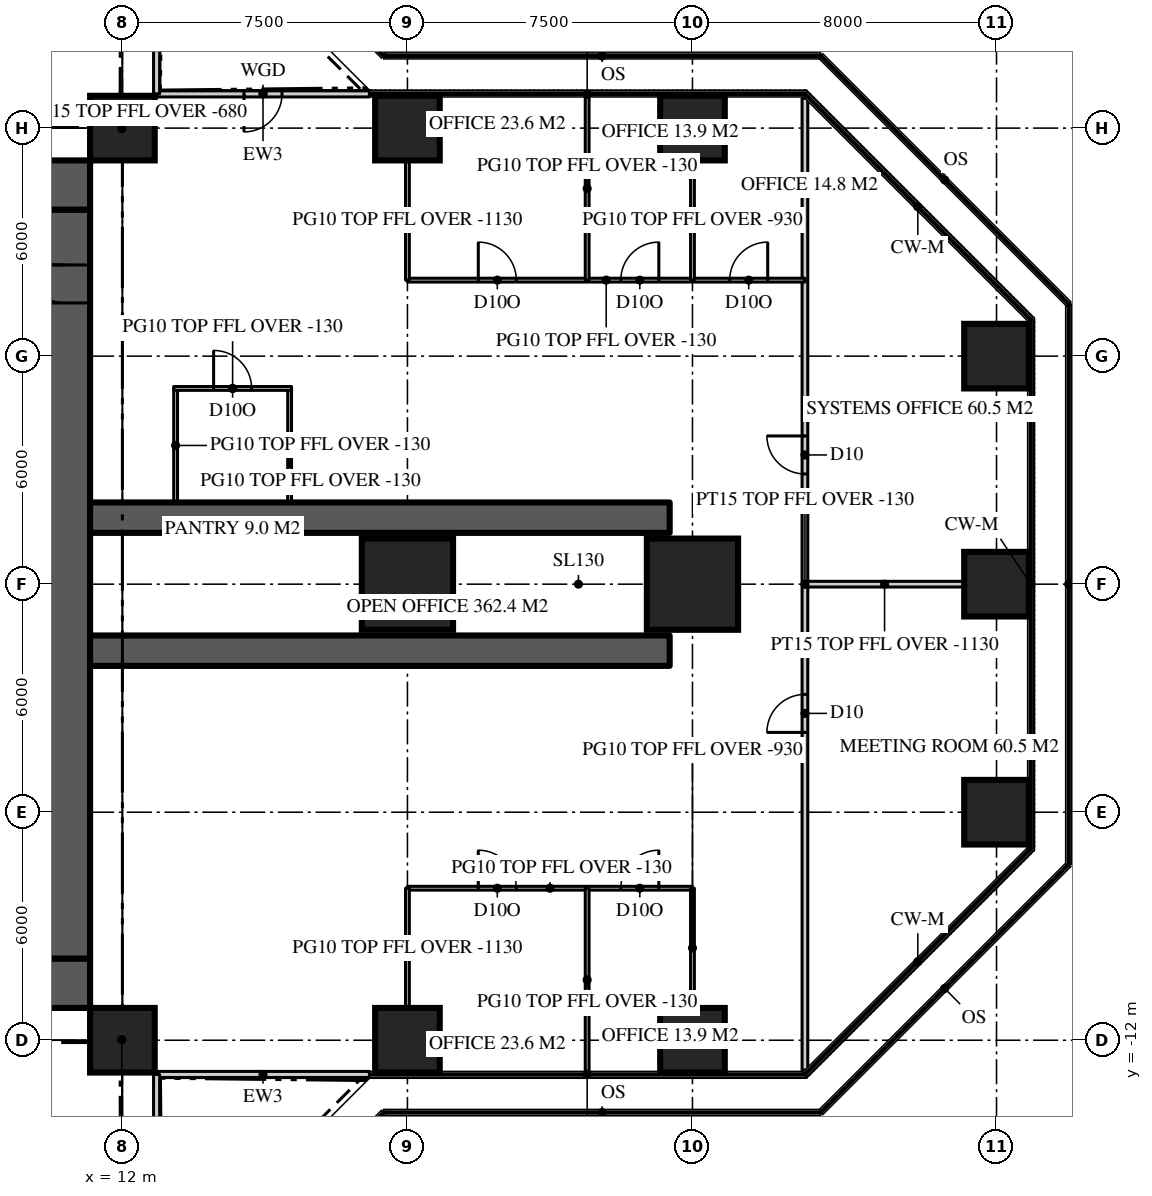
"""IFC4 building model, lengths in metres.
Left out: names, types, materials, properties, quantities, classifications, styles, units other than length and angle.
Written with IfcOpenShell. Run it as: python <this file> out.ifc"""

import sys

from ifc_helpers import new_model, si_unit, direction, frame, frame_2d, origin, origin_2d, place, context, subcontext, project, spatial, rectangle, extrude, element, fill, save


model = new_model("IFC4")
c1 = context("Model", 3, precision=1e-05, world=origin(), true_north=direction((0.0, 1.0)))
c2 = subcontext(c1, "Body", "Model", "MODEL_VIEW")
j1 = project(units=[si_unit("LENGTHUNIT", "METRE"), si_unit("PLANEANGLEUNIT", "RADIAN")], contexts=[c1])
p1 = place(None, origin())
s1 = spatial("IfcSite", under=j1, at=p1, CompositionType="ELEMENT")
p2 = place(p1, origin())
s2 = spatial("IfcBuilding", under=s1, at=p2, CompositionType="ELEMENT")
p3 = place(p2, frame((0.0, 0.0, 151.5)))
s3 = spatial("IfcBuildingStorey", under=s2, at=p3, CompositionType="ELEMENT", Elevation=151.5)
p4 = place(p3, frame((-11.15, 10.5, 0.0), z_axis=(0.0, 0.0, 1.0), x_axis=(1.0, 0.0, 0.0)))
e1 = element("IfcWall", 1, at=p4, inside=s3, PredefinedType="SHEAR", context=c2, shape_type="SweptSolid", body=[
    extrude(rectangle(XDim=22.3, YDim=1.3, at=frame_2d((11.15, 0.0))), origin(), (0.0, 0.0, 1.0), 3.9),
])
p5 = place(p4, frame((4.25, 0.0, 0.0)))
e2 = element("IfcOpeningElement", 2, at=p5, cuts=e1, PredefinedType="OPENING", context=c2, shape_type="SweptSolid", body=[
    extrude(rectangle(XDim=1.8, YDim=2.2, at=frame_2d((0.9, 1.1))), frame((0.0, 0.66, 0.0), z_axis=(0.0, -1.0, 0.0), x_axis=(1.0, 0.0, 0.0)), (0.0, 0.0, 1.0), 1.32),
])
p6 = place(p4, frame((16.25, 0.0, 0.0)))
e3 = element("IfcOpeningElement", 3, at=p6, cuts=e1, PredefinedType="OPENING", context=c2, shape_type="SweptSolid", body=[
    extrude(rectangle(XDim=1.8, YDim=2.2, at=frame_2d((0.9, 1.1))), frame((0.0, 0.66, 0.0), z_axis=(0.0, -1.0, 0.0), x_axis=(1.0, 0.0, 0.0)), (0.0, 0.0, 1.0), 1.32),
])
p7 = place(p3, frame((11.15, -10.5, 0.0), z_axis=(0.0, 0.0, 1.0), x_axis=(-1.0, 0.0, 0.0)))
e4 = element("IfcWall", 4, at=p7, inside=s3, PredefinedType="SHEAR", context=c2, shape_type="SweptSolid", body=[
    extrude(rectangle(XDim=22.3, YDim=1.3, at=frame_2d((11.15, 0.0))), origin(), (0.0, 0.0, 1.0), 3.9),
])
p8 = place(p7, frame((16.25, 0.0, 0.0)))
e5 = element("IfcOpeningElement", 5, at=p8, cuts=e4, PredefinedType="OPENING", context=c2, shape_type="SweptSolid", body=[
    extrude(rectangle(XDim=1.8, YDim=2.2, at=frame_2d((0.9, 1.1))), frame((0.0, 0.66, 0.0), z_axis=(0.0, -1.0, 0.0), x_axis=(1.0, 0.0, 0.0)), (0.0, 0.0, 1.0), 1.32),
])
p9 = place(p7, frame((4.25, 0.0, 0.0)))
e6 = element("IfcOpeningElement", 6, at=p9, cuts=e4, PredefinedType="OPENING", context=c2, shape_type="SweptSolid", body=[
    extrude(rectangle(XDim=1.8, YDim=2.2, at=frame_2d((0.9, 1.1))), frame((0.0, 0.66, 0.0), z_axis=(0.0, -1.0, 0.0), x_axis=(1.0, 0.0, 0.0)), (0.0, 0.0, 1.0), 1.32),
])
p10 = place(p3, frame((10.5, -9.85, 0.0), z_axis=(0.0, 0.0, 1.0), x_axis=(0.0, 1.0, 0.0)))
e7 = element("IfcWall", 7, at=p10, inside=s3, PredefinedType="SHEAR", context=c2, shape_type="SweptSolid", body=[
    extrude(rectangle(XDim=19.7, YDim=1.3, at=frame_2d((9.85, 0.0))), origin(), (0.0, 0.0, 1.0), 3.9),
])
p11 = place(p10, frame((17.25, 0.0, 0.0)))
e8 = element("IfcOpeningElement", 8, at=p11, cuts=e7, PredefinedType="OPENING", context=c2, shape_type="SweptSolid", body=[
    extrude(rectangle(XDim=1.0, YDim=2.2, at=frame_2d((0.5, 1.1))), frame((0.0, 0.66, 0.0), z_axis=(0.0, -1.0, 0.0), x_axis=(1.0, 0.0, 0.0)), (0.0, 0.0, 1.0), 1.32),
])
for number, where, z_axis, x_axis in (
    (9, (11.15, -1.75, 0.0), (0.0, 0.0, 1.0), (1.0, 0.0, 0.0)),
    (10, (11.15, 1.75, 0.0), (0.0, 0.0, 1.0), (1.0, 0.0, 0.0)),
):
    element("IfcWall", number, at=place(p3, frame(where, z_axis=z_axis, x_axis=x_axis)), inside=s3, PredefinedType="SHEAR", context=c2, shape_type="SweptSolid", body=[
        extrude(rectangle(XDim=15.25, YDim=0.8, at=frame_2d((7.625, 0.0))), origin(), (0.0, 0.0, 1.0), 3.9),
    ])
for number, where, z_axis, x_axis in (
    (11, (12.0, -12.0, 0.0), (0.0, 0.0, 1.0), (1.0, 0.0, 0.0)),
    (12, (19.5, -12.0, 0.0), (0.0, 0.0, 1.0), (1.0, 0.0, 0.0)),
    (13, (27.0, -12.0, 0.0), (0.0, 0.0, 1.0), (1.0, 0.0, 0.0)),
    (14, (35.0, -6.0, 0.0), (0.0, 0.0, 1.0), (1.0, 0.0, 0.0)),
):
    element("IfcColumn", number, at=place(p3, frame(where, z_axis=z_axis, x_axis=x_axis)), inside=s3, PredefinedType="COLUMN", context=c2, shape_type="SweptSolid", body=[
        extrude(rectangle(XDim=1.7, YDim=1.7, at=origin_2d()), origin(), (0.0, 0.0, 1.0), 3.9),
    ])
for number, where, z_axis, x_axis in (
    (15, (19.5, 0.0, 0.0), (0.0, 0.0, 1.0), (1.0, 0.0, 0.0)),
    (16, (27.0, 0.0, 0.0), (0.0, 0.0, 1.0), (1.0, 0.0, 0.0)),
):
    element("IfcColumn", number, at=place(p3, frame(where, z_axis=z_axis, x_axis=x_axis)), inside=s3, PredefinedType="COLUMN", context=c2, shape_type="SweptSolid", body=[
        extrude(rectangle(XDim=2.4, YDim=2.4, at=origin_2d()), origin(), (0.0, 0.0, 1.0), 3.9),
    ])
for number, where, z_axis, x_axis in (
    (17, (35.0, 0.0, 0.0), (0.0, 0.0, 1.0), (1.0, 0.0, 0.0)),
    (18, (35.0, 6.0, 0.0), (0.0, 0.0, 1.0), (1.0, 0.0, 0.0)),
    (19, (12.0, 12.0, 0.0), (0.0, 0.0, 1.0), (1.0, 0.0, 0.0)),
    (20, (19.5, 12.0, 0.0), (0.0, 0.0, 1.0), (1.0, 0.0, 0.0)),
    (21, (27.0, 12.0, 0.0), (0.0, 0.0, 1.0), (1.0, 0.0, 0.0)),
):
    element("IfcColumn", number, at=place(p3, frame(where, z_axis=z_axis, x_axis=x_axis)), inside=s3, PredefinedType="COLUMN", context=c2, shape_type="SweptSolid", body=[
        extrude(rectangle(XDim=1.7, YDim=1.7, at=origin_2d()), origin(), (0.0, 0.0, 1.0), 3.9),
    ])
p12 = place(p3, frame((12.9, -12.9, 0.0), z_axis=(0.0, 0.0, 1.0), x_axis=(1.0, 0.0, 0.0)))
e22 = element("IfcWall", 22, at=p12, inside=s3, PredefinedType="SOLIDWALL", context=c2, shape_type="SweptSolid", body=[
    extrude(rectangle(XDim=5.6, YDim=0.16, at=frame_2d((2.8, 0.0))), origin(), (0.0, 0.0, 1.0), 3.77),
])
p13 = place(p3, frame((18.5, 12.9, 0.0), z_axis=(0.0, 0.0, 1.0), x_axis=(-1.0, 0.0, 0.0)))
e23 = element("IfcWall", 23, at=p13, inside=s3, PredefinedType="SOLIDWALL", context=c2, shape_type="SweptSolid", body=[
    extrude(rectangle(XDim=5.6, YDim=0.16, at=frame_2d((2.8, 0.0))), origin(), (0.0, 0.0, 1.0), 3.77),
])
p14 = place(p13, frame((2.3, 0.0, 0.0)))
e24 = element("IfcOpeningElement", 24, at=p14, cuts=e23, PredefinedType="OPENING", context=c2, shape_type="SweptSolid", body=[
    extrude(rectangle(XDim=1.0, YDim=2.2, at=frame_2d((0.5, 1.1))), frame((0.0, 0.09, 0.0), z_axis=(0.0, -1.0, 0.0), x_axis=(1.0, 0.0, 0.0)), (0.0, 0.0, 1.0), 0.18),
])
p15 = place(p3, frame((12.9, 12.9, 0.0), z_axis=(0.0, 0.0, 1.0), x_axis=(0.0, 1.0, 0.0)))
e25 = element("IfcWall", 25, at=p15, inside=s3, PredefinedType="SOLIDWALL", context=c2, shape_type="SweptSolid", body=[
    extrude(rectangle(XDim=5.6, YDim=0.16, at=frame_2d((2.8, 0.0))), origin(), (0.0, 0.0, 1.0), 3.77),
])
p16 = place(p3, frame((12.9, -18.5, 0.0), z_axis=(0.0, 0.0, 1.0), x_axis=(0.0, 1.0, 0.0)))
e26 = element("IfcWall", 26, at=p16, inside=s3, PredefinedType="SOLIDWALL", context=c2, shape_type="SweptSolid", body=[
    extrude(rectangle(XDim=5.6, YDim=0.16, at=frame_2d((2.8, 0.0))), origin(), (0.0, 0.0, 1.0), 3.77),
])
p17 = place(p16, frame((2.3, 0.0, 0.0)))
e27 = element("IfcOpeningElement", 27, at=p17, cuts=e26, PredefinedType="OPENING", context=c2, shape_type="SweptSolid", body=[
    extrude(rectangle(XDim=1.0, YDim=2.2, at=frame_2d((0.5, 1.1))), frame((0.0, 0.09, 0.0), z_axis=(0.0, -1.0, 0.0), x_axis=(1.0, 0.0, 0.0)), (0.0, 0.0, 1.0), 0.18),
])
p18 = place(p3, frame((29.959, -12.786, 0.0), z_axis=(0.0, 0.0, 1.0), x_axis=(0.0, 1.0, 0.0)))
e28 = element("IfcWall", 28, at=p18, inside=s3, PredefinedType="PARTITIONING", context=c2, shape_type="SweptSolid", body=[
    extrude(rectangle(XDim=25.573, YDim=0.15, at=frame_2d((12.786, 0.0))), origin(), (0.0, 0.0, 1.0), 3.77),
])
p19 = place(p18, frame((15.687, 0.0, 0.0)))
e29 = element("IfcOpeningElement", 29, at=p19, cuts=e28, PredefinedType="OPENING", context=c2, shape_type="SweptSolid", body=[
    extrude(rectangle(XDim=1.0, YDim=2.2, at=frame_2d((0.5, 1.1))), frame((0.0, 0.085, 0.0), z_axis=(0.0, -1.0, 0.0), x_axis=(1.0, 0.0, 0.0)), (0.0, 0.0, 1.0), 0.17),
])
p20 = place(p18, frame((8.886, 0.0, 0.0)))
e30 = element("IfcOpeningElement", 30, at=p20, cuts=e28, PredefinedType="OPENING", context=c2, shape_type="SweptSolid", body=[
    extrude(rectangle(XDim=1.0, YDim=2.2, at=frame_2d((0.5, 1.1))), frame((0.0, 0.085, 0.0), z_axis=(0.0, -1.0, 0.0), x_axis=(1.0, 0.0, 0.0)), (0.0, 0.0, 1.0), 0.17),
])
p21 = place(p3, frame((29.959, 0.0, 0.0), z_axis=(0.0, 0.0, 1.0), x_axis=(1.0, 0.0, 0.0)))
e31 = element("IfcWall", 31, at=p21, inside=s3, PredefinedType="PARTITIONING", context=c2, shape_type="SweptSolid", body=[
    extrude(rectangle(XDim=4.191, YDim=0.15, at=frame_2d((2.095, 0.0))), origin(), (0.0, 0.0, 1.0), 2.77),
])
p22 = place(p3, frame((19.5, 8.0, 0.0), z_axis=(0.0, 0.0, 1.0), x_axis=(1.0, 0.0, 0.0)))
e32 = element("IfcWall", 32, at=p22, inside=s3, PredefinedType="PARTITIONING", context=c2, shape_type="SweptSolid", body=[
    extrude(rectangle(XDim=10.459, YDim=0.1, at=frame_2d((5.229, 0.0))), origin(), (0.0, 0.0, 1.0), 3.77),
])
p23 = place(p22, frame((1.865, 0.0, 0.0)))
e33 = element("IfcOpeningElement", 33, at=p23, cuts=e32, PredefinedType="OPENING", context=c2, shape_type="SweptSolid", body=[
    extrude(rectangle(XDim=1.0, YDim=2.2, at=frame_2d((0.5, 1.1))), frame((0.0, 0.06, 0.0), z_axis=(0.0, -1.0, 0.0), x_axis=(1.0, 0.0, 0.0)), (0.0, 0.0, 1.0), 0.12),
])
p24 = place(p22, frame((5.615, 0.0, 0.0)))
e34 = element("IfcOpeningElement", 34, at=p24, cuts=e32, PredefinedType="OPENING", context=c2, shape_type="SweptSolid", body=[
    extrude(rectangle(XDim=1.0, YDim=2.2, at=frame_2d((0.5, 1.1))), frame((0.0, 0.06, 0.0), z_axis=(0.0, -1.0, 0.0), x_axis=(1.0, 0.0, 0.0)), (0.0, 0.0, 1.0), 0.12),
])
p25 = place(p22, frame((8.479, 0.0, 0.0)))
e35 = element("IfcOpeningElement", 35, at=p25, cuts=e32, PredefinedType="OPENING", context=c2, shape_type="SweptSolid", body=[
    extrude(rectangle(XDim=1.0, YDim=2.2, at=frame_2d((0.5, 1.1))), frame((0.0, 0.06, 0.0), z_axis=(0.0, -1.0, 0.0), x_axis=(1.0, 0.0, 0.0)), (0.0, 0.0, 1.0), 0.12),
])
p26 = place(p3, frame((19.5, 8.0, 0.0), z_axis=(0.0, 0.0, 1.0), x_axis=(0.0, 1.0, 0.0)))
e36 = element("IfcWall", 36, at=p26, inside=s3, PredefinedType="PARTITIONING", context=c2, shape_type="SweptSolid", body=[
    extrude(rectangle(XDim=3.15, YDim=0.1, at=frame_2d((1.575, 0.0))), origin(), (0.0, 0.0, 1.0), 2.77),
])
p27 = place(p3, frame((24.229, 8.0, 0.0), z_axis=(0.0, 0.0, 1.0), x_axis=(0.0, 1.0, 0.0)))
e37 = element("IfcWall", 37, at=p27, inside=s3, PredefinedType="PARTITIONING", context=c2, shape_type="SweptSolid", body=[
    extrude(rectangle(XDim=4.82, YDim=0.1, at=frame_2d((2.41, 0.0))), origin(), (0.0, 0.0, 1.0), 3.77),
])
p28 = place(p3, frame((27.0, 8.0, 0.0), z_axis=(0.0, 0.0, 1.0), x_axis=(0.0, 1.0, 0.0)))
e38 = element("IfcWall", 38, at=p28, inside=s3, PredefinedType="PARTITIONING", context=c2, shape_type="SweptSolid", body=[
    extrude(rectangle(XDim=3.15, YDim=0.1, at=frame_2d((1.575, 0.0))), origin(), (0.0, 0.0, 1.0), 2.97),
])
p29 = place(p3, frame((19.5, -8.0, 0.0), z_axis=(0.0, 0.0, 1.0), x_axis=(1.0, 0.0, 0.0)))
e39 = element("IfcWall", 39, at=p29, inside=s3, PredefinedType="PARTITIONING", context=c2, shape_type="SweptSolid", body=[
    extrude(rectangle(XDim=7.5, YDim=0.1, at=frame_2d((3.75, 0.0))), origin(), (0.0, 0.0, 1.0), 3.77),
])
p30 = place(p29, frame((1.865, 0.0, 0.0)))
e40 = element("IfcOpeningElement", 40, at=p30, cuts=e39, PredefinedType="OPENING", context=c2, shape_type="SweptSolid", body=[
    extrude(rectangle(XDim=1.0, YDim=2.2, at=frame_2d((0.5, 1.1))), frame((0.0, 0.06, 0.0), z_axis=(0.0, -1.0, 0.0), x_axis=(1.0, 0.0, 0.0)), (0.0, 0.0, 1.0), 0.12),
])
p31 = place(p29, frame((5.615, 0.0, 0.0)))
e41 = element("IfcOpeningElement", 41, at=p31, cuts=e39, PredefinedType="OPENING", context=c2, shape_type="SweptSolid", body=[
    extrude(rectangle(XDim=1.0, YDim=2.2, at=frame_2d((0.5, 1.1))), frame((0.0, 0.06, 0.0), z_axis=(0.0, -1.0, 0.0), x_axis=(1.0, 0.0, 0.0)), (0.0, 0.0, 1.0), 0.12),
])
p32 = place(p3, frame((19.5, -8.0, 0.0), z_axis=(0.0, 0.0, 1.0), x_axis=(0.0, -1.0, 0.0)))
e42 = element("IfcWall", 42, at=p32, inside=s3, PredefinedType="PARTITIONING", context=c2, shape_type="SweptSolid", body=[
    extrude(rectangle(XDim=3.15, YDim=0.1, at=frame_2d((1.575, 0.0))), origin(), (0.0, 0.0, 1.0), 2.77),
])
p33 = place(p3, frame((24.229, -8.0, 0.0), z_axis=(0.0, 0.0, 1.0), x_axis=(0.0, -1.0, 0.0)))
e43 = element("IfcWall", 43, at=p33, inside=s3, PredefinedType="PARTITIONING", context=c2, shape_type="SweptSolid", body=[
    extrude(rectangle(XDim=4.82, YDim=0.1, at=frame_2d((2.41, 0.0))), origin(), (0.0, 0.0, 1.0), 3.77),
])
p34 = place(p3, frame((27.0, -8.0, 0.0), z_axis=(0.0, 0.0, 1.0), x_axis=(0.0, -1.0, 0.0)))
e44 = element("IfcWall", 44, at=p34, inside=s3, PredefinedType="PARTITIONING", context=c2, shape_type="SweptSolid", body=[
    extrude(rectangle(XDim=3.15, YDim=0.1, at=frame_2d((1.575, 0.0))), origin(), (0.0, 0.0, 1.0), 2.97),
])
for number, where, z_axis, x_axis in (
    (45, (13.4, 2.15, 0.0), (0.0, 0.0, 1.0), (0.0, 1.0, 0.0)),
    (46, (16.4, 2.15, 0.0), (0.0, 0.0, 1.0), (0.0, 1.0, 0.0)),
):
    element("IfcWall", number, at=place(p3, frame(where, z_axis=z_axis, x_axis=x_axis)), inside=s3, PredefinedType="PARTITIONING", context=c2, shape_type="SweptSolid", body=[
        extrude(rectangle(XDim=3.0, YDim=0.1, at=frame_2d((1.5, 0.0))), origin(), (0.0, 0.0, 1.0), 3.77),
    ])
p35 = place(p3, frame((13.35, 5.15, 0.0), z_axis=(0.0, 0.0, 1.0), x_axis=(1.0, 0.0, 0.0)))
e47 = element("IfcWall", 47, at=p35, inside=s3, PredefinedType="PARTITIONING", context=c2, shape_type="SweptSolid", body=[
    extrude(rectangle(XDim=3.1, YDim=0.1, at=frame_2d((1.55, 0.0))), origin(), (0.0, 0.0, 1.0), 3.77),
])
p36 = place(p35, frame((1.05, 0.0, 0.0)))
e48 = element("IfcOpeningElement", 48, at=p36, cuts=e47, PredefinedType="OPENING", context=c2, shape_type="SweptSolid", body=[
    extrude(rectangle(XDim=1.0, YDim=2.2, at=frame_2d((0.5, 1.1))), frame((0.0, 0.06, 0.0), z_axis=(0.0, -1.0, 0.0), x_axis=(1.0, 0.0, 0.0)), (0.0, 0.0, 1.0), 0.12),
])
for number, where, z_axis, x_axis in (
    (49, (11.15, 11.15, 0.0), (0.0, 0.0, 1.0), (0.707, 0.707, 0.0)),
    (50, (11.15, -11.15, 0.0), (0.0, 0.0, 1.0), (0.707, -0.707, 0.0)),
):
    element("IfcWall", number, at=place(p3, frame(where, z_axis=z_axis, x_axis=x_axis)), inside=s3, PredefinedType="PARTITIONING", context=c2, shape_type="SweptSolid", body=[
        extrude(rectangle(XDim=2.362, YDim=0.15, at=frame_2d((1.181, 0.0))), origin(), (0.0, 0.0, 1.0), 3.22),
    ])
p37 = place(p14, origin())
e51 = element("IfcDoor", 51, at=p37, inside=s3, OperationType="SINGLE_SWING_RIGHT", PredefinedType="DOOR", context=c2, shape_type="SweptSolid", body=[
    extrude(rectangle(XDim=1.0, YDim=2.2, at=frame_2d((0.5, 1.1))), frame((0.0, 0.025, 0.0), z_axis=(0.0, -1.0, 0.0), x_axis=(1.0, 0.0, 0.0)), (0.0, 0.0, 1.0), 0.05),
])
fill(e24, e51)
p38 = place(p11, origin())
e52 = element("IfcDoor", 52, at=p38, inside=s3, OperationType="SINGLE_SWING_RIGHT", PredefinedType="DOOR", context=c2, shape_type="SweptSolid", body=[
    extrude(rectangle(XDim=1.0, YDim=2.2, at=frame_2d((0.5, 1.1))), frame((0.0, 0.025, 0.0), z_axis=(0.0, -1.0, 0.0), x_axis=(1.0, 0.0, 0.0)), (0.0, 0.0, 1.0), 0.05),
])
fill(e8, e52)
p39 = place(p19, origin())
e53 = element("IfcDoor", 53, at=p39, inside=s3, OperationType="SINGLE_SWING_RIGHT", PredefinedType="DOOR", context=c2, shape_type="SweptSolid", body=[
    extrude(rectangle(XDim=1.0, YDim=2.2, at=frame_2d((0.5, 1.1))), frame((0.0, 0.025, 0.0), z_axis=(0.0, -1.0, 0.0), x_axis=(1.0, 0.0, 0.0)), (0.0, 0.0, 1.0), 0.05),
])
fill(e29, e53)
p40 = place(p20, origin())
e54 = element("IfcDoor", 54, at=p40, inside=s3, OperationType="SINGLE_SWING_LEFT", PredefinedType="DOOR", context=c2, shape_type="SweptSolid", body=[
    extrude(rectangle(XDim=1.0, YDim=2.2, at=frame_2d((0.5, 1.1))), frame((0.0, 0.025, 0.0), z_axis=(0.0, -1.0, 0.0), x_axis=(1.0, 0.0, 0.0)), (0.0, 0.0, 1.0), 0.05),
])
fill(e30, e54)
p41 = place(p23, origin())
e55 = element("IfcDoor", 55, at=p41, inside=s3, OperationType="SINGLE_SWING_LEFT", PredefinedType="DOOR", context=c2, shape_type="SweptSolid", body=[
    extrude(rectangle(XDim=1.0, YDim=2.2, at=frame_2d((0.5, 1.1))), frame((0.0, 0.025, 0.0), z_axis=(0.0, -1.0, 0.0), x_axis=(1.0, 0.0, 0.0)), (0.0, 0.0, 1.0), 0.05),
])
fill(e33, e55)
p42 = place(p24, origin())
e56 = element("IfcDoor", 56, at=p42, inside=s3, OperationType="SINGLE_SWING_RIGHT", PredefinedType="DOOR", context=c2, shape_type="SweptSolid", body=[
    extrude(rectangle(XDim=1.0, YDim=2.2, at=frame_2d((0.5, 1.1))), frame((0.0, 0.025, 0.0), z_axis=(0.0, -1.0, 0.0), x_axis=(1.0, 0.0, 0.0)), (0.0, 0.0, 1.0), 0.05),
])
fill(e34, e56)
p43 = place(p25, origin())
e57 = element("IfcDoor", 57, at=p43, inside=s3, OperationType="SINGLE_SWING_RIGHT", PredefinedType="DOOR", context=c2, shape_type="SweptSolid", body=[
    extrude(rectangle(XDim=1.0, YDim=2.2, at=frame_2d((0.5, 1.1))), frame((0.0, 0.025, 0.0), z_axis=(0.0, -1.0, 0.0), x_axis=(1.0, 0.0, 0.0)), (0.0, 0.0, 1.0), 0.05),
])
fill(e35, e57)
p44 = place(p30, origin())
e58 = element("IfcDoor", 58, at=p44, inside=s3, OperationType="SINGLE_SWING_LEFT", PredefinedType="DOOR", context=c2, shape_type="SweptSolid", body=[
    extrude(rectangle(XDim=1.0, YDim=2.2, at=frame_2d((0.5, 1.1))), frame((0.0, 0.025, 0.0), z_axis=(0.0, -1.0, 0.0), x_axis=(1.0, 0.0, 0.0)), (0.0, 0.0, 1.0), 0.05),
])
fill(e40, e58)
p45 = place(p31, origin())
e59 = element("IfcDoor", 59, at=p45, inside=s3, OperationType="SINGLE_SWING_RIGHT", PredefinedType="DOOR", context=c2, shape_type="SweptSolid", body=[
    extrude(rectangle(XDim=1.0, YDim=2.2, at=frame_2d((0.5, 1.1))), frame((0.0, 0.025, 0.0), z_axis=(0.0, -1.0, 0.0), x_axis=(1.0, 0.0, 0.0)), (0.0, 0.0, 1.0), 0.05),
])
fill(e41, e59)
p46 = place(p36, origin())
e60 = element("IfcDoor", 60, at=p46, inside=s3, OperationType="SINGLE_SWING_LEFT", PredefinedType="DOOR", context=c2, shape_type="SweptSolid", body=[
    extrude(rectangle(XDim=1.0, YDim=2.2, at=frame_2d((0.5, 1.1))), frame((0.0, 0.025, 0.0), z_axis=(0.0, -1.0, 0.0), x_axis=(1.0, 0.0, 0.0)), (0.0, 0.0, 1.0), 0.05),
])
fill(e48, e60)
save(model, sys.argv[1])
